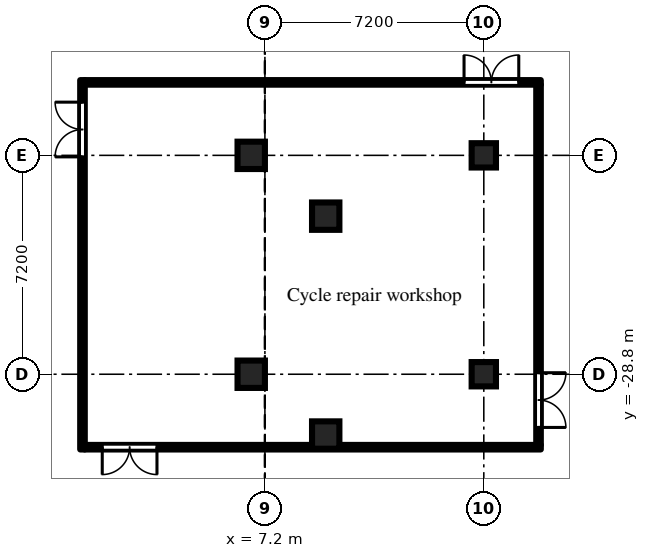
"""IFC4 building model, lengths in metres.
Left out: names, types, materials, properties, quantities, classifications, styles, units other than length and angle.
Written with IfcOpenShell. Run it as: python <this file> out.ifc"""

import sys

from ifc_helpers import new_model, si_unit, direction, frame, frame_2d, origin, origin_2d, place, context, subcontext, project, spatial, rectangle, extrude, element, fill, save


model = new_model("IFC4")
c1 = context("Model", 3, precision=1e-05, world=origin(), true_north=direction((0.0, 1.0)))
c2 = subcontext(c1, "Body", "Model", "MODEL_VIEW")
j1 = project(units=[si_unit("LENGTHUNIT", "METRE"), si_unit("PLANEANGLEUNIT", "RADIAN")], contexts=[c1])
p1 = place(None, origin())
s1 = spatial("IfcSite", under=j1, at=p1, CompositionType="ELEMENT")
p2 = place(p1, origin())
s2 = spatial("IfcBuilding", under=s1, at=p2, CompositionType="ELEMENT")
p3 = place(p2, frame((0.0, 0.0, -4.8)))
s3 = spatial("IfcBuildingStorey", under=s2, at=p3, CompositionType="ELEMENT", Elevation=-4.8)
for number, where, z_axis, x_axis in (
    (1, (6.75, -28.8, -0.5), (0.0, 0.0, 1.0), (1.0, 0.0, 0.0)),
    (2, (6.75, -21.6, -0.5), (0.0, 0.0, 1.0), (1.0, 0.0, 0.0)),
):
    element("IfcColumn", number, at=place(p3, frame(where, z_axis=z_axis, x_axis=x_axis)), inside=s3, PredefinedType="COLUMN", context=c2, shape_type="SweptSolid", body=[
        extrude(rectangle(XDim=0.9, YDim=0.9, at=origin_2d()), origin(), (0.0, 0.0, 1.0), 5.3),
    ])
for number, where, z_axis, x_axis in (
    (3, (14.4, -28.8, -0.5), (0.0, 0.0, 1.0), (1.0, 0.0, 0.0)),
    (4, (14.4, -21.6, -0.5), (0.0, 0.0, 1.0), (1.0, 0.0, 0.0)),
):
    element("IfcColumn", number, at=place(p3, frame(where, z_axis=z_axis, x_axis=x_axis)), inside=s3, PredefinedType="COLUMN", context=c2, shape_type="SweptSolid", body=[
        extrude(rectangle(XDim=0.8, YDim=0.8, at=origin_2d()), origin(), (0.0, 0.0, 1.0), 5.3),
    ])
for number, where, z_axis, x_axis in (
    (5, (9.2, -30.8, -0.5), (0.0, 0.0, 1.0), (1.0, 0.0, 0.0)),
    (6, (9.2, -23.6, -0.5), (0.0, 0.0, 1.0), (1.0, 0.0, 0.0)),
):
    element("IfcColumn", number, at=place(p3, frame(where, z_axis=z_axis, x_axis=x_axis)), inside=s3, PredefinedType="COLUMN", context=c2, shape_type="SweptSolid", body=[
        extrude(rectangle(XDim=0.9, YDim=0.9, at=origin_2d()), origin(), (0.0, 0.0, 1.0), 5.3),
    ])
p4 = place(p3, frame((1.2, -31.275, 0.0), z_axis=(0.0, 0.0, 1.0), x_axis=(0.0, 1.0, 0.0)))
e7 = element("IfcWall", 7, at=p4, inside=s3, PredefinedType="PARTITIONING", context=c2, shape_type="SweptSolid", body=[
    extrude(rectangle(XDim=12.15, YDim=0.15, at=frame_2d((6.075, 0.0))), origin(), (0.0, 0.0, 1.0), 4.35),
])
p5 = place(p4, frame((9.625, 0.0, 0.0)))
e8 = element("IfcOpeningElement", 8, at=p5, cuts=e7, PredefinedType="OPENING", context=c2, shape_type="SweptSolid", body=[
    extrude(rectangle(XDim=1.8, YDim=2.1, at=frame_2d((0.9, 1.05))), frame((0.0, 0.085, 0.0), z_axis=(0.0, -1.0, 0.0), x_axis=(1.0, 0.0, 0.0)), (0.0, 0.0, 1.0), 0.17),
])
p6 = place(p3, frame((1.275, -31.2, 0.0), z_axis=(0.0, 0.0, 1.0), x_axis=(1.0, 0.0, 0.0)))
e9 = element("IfcWall", 9, at=p6, inside=s3, PredefinedType="PARTITIONING", context=c2, shape_type="SweptSolid", body=[
    extrude(rectangle(XDim=15.0, YDim=0.15, at=frame_2d((7.5, 0.0))), origin(), (0.0, 0.0, 1.0), 4.35),
])
p7 = place(p6, frame((0.575, 0.0, 0.0)))
e10 = element("IfcOpeningElement", 10, at=p7, cuts=e9, PredefinedType="OPENING", context=c2, shape_type="SweptSolid", body=[
    extrude(rectangle(XDim=1.8, YDim=2.1, at=frame_2d((0.9, 1.05))), frame((0.0, 0.085, 0.0), z_axis=(0.0, -1.0, 0.0), x_axis=(1.0, 0.0, 0.0)), (0.0, 0.0, 1.0), 0.17),
])
p8 = place(p3, frame((1.275, -19.2, 0.0), z_axis=(0.0, 0.0, 1.0), x_axis=(1.0, 0.0, 0.0)))
e11 = element("IfcWall", 11, at=p8, inside=s3, PredefinedType="PARTITIONING", context=c2, shape_type="SweptSolid", body=[
    extrude(rectangle(XDim=15.0, YDim=0.15, at=frame_2d((7.5, 0.0))), origin(), (0.0, 0.0, 1.0), 4.35),
])
p9 = place(p8, frame((12.475, 0.0, 0.0)))
e12 = element("IfcOpeningElement", 12, at=p9, cuts=e11, PredefinedType="OPENING", context=c2, shape_type="SweptSolid", body=[
    extrude(rectangle(XDim=1.8, YDim=2.1, at=frame_2d((0.9, 1.05))), frame((0.0, 0.085, 0.0), z_axis=(0.0, -1.0, 0.0), x_axis=(1.0, 0.0, 0.0)), (0.0, 0.0, 1.0), 0.17),
])
p10 = place(p3, frame((16.2, -31.125, 0.0), z_axis=(0.0, 0.0, 1.0), x_axis=(0.0, 1.0, 0.0)))
e13 = element("IfcWall", 13, at=p10, inside=s3, PredefinedType="PARTITIONING", context=c2, shape_type="SweptSolid", body=[
    extrude(rectangle(XDim=11.85, YDim=0.15, at=frame_2d((5.925, 0.0))), origin(), (0.0, 0.0, 1.0), 4.35),
])
p11 = place(p10, frame((0.575, 0.0, 0.0)))
e14 = element("IfcOpeningElement", 14, at=p11, cuts=e13, PredefinedType="OPENING", context=c2, shape_type="SweptSolid", body=[
    extrude(rectangle(XDim=1.8, YDim=2.1, at=frame_2d((0.9, 1.05))), frame((0.0, 0.085, 0.0), z_axis=(0.0, -1.0, 0.0), x_axis=(1.0, 0.0, 0.0)), (0.0, 0.0, 1.0), 0.17),
])
p12 = place(p5, origin())
e15 = element("IfcDoor", 15, at=p12, inside=s3, OperationType="DOUBLE_DOOR_DOUBLE_SWING", PredefinedType="DOOR", context=c2, shape_type="SweptSolid", body=[
    extrude(rectangle(XDim=1.8, YDim=2.1, at=frame_2d((0.9, 1.05))), frame((0.0, 0.025, 0.0), z_axis=(0.0, -1.0, 0.0), x_axis=(1.0, 0.0, 0.0)), (0.0, 0.0, 1.0), 0.05),
])
fill(e8, e15)
p13 = place(p7, frame((1.8, 0.0, 0.0), z_axis=(0.0, 0.0, 1.0), x_axis=(-1.0, 0.0, 0.0)))
e16 = element("IfcDoor", 16, at=p13, inside=s3, OperationType="DOUBLE_DOOR_DOUBLE_SWING", PredefinedType="DOOR", context=c2, shape_type="SweptSolid", body=[
    extrude(rectangle(XDim=1.8, YDim=2.1, at=frame_2d((0.9, 1.05))), frame((0.0, 0.025, 0.0), z_axis=(0.0, -1.0, 0.0), x_axis=(1.0, 0.0, 0.0)), (0.0, 0.0, 1.0), 0.05),
])
fill(e10, e16)
p14 = place(p9, origin())
e17 = element("IfcDoor", 17, at=p14, inside=s3, OperationType="DOUBLE_DOOR_DOUBLE_SWING", PredefinedType="DOOR", context=c2, shape_type="SweptSolid", body=[
    extrude(rectangle(XDim=1.8, YDim=2.1, at=frame_2d((0.9, 1.05))), frame((0.0, 0.025, 0.0), z_axis=(0.0, -1.0, 0.0), x_axis=(1.0, 0.0, 0.0)), (0.0, 0.0, 1.0), 0.05),
])
fill(e12, e17)
p15 = place(p11, frame((1.8, 0.0, 0.0), z_axis=(0.0, 0.0, 1.0), x_axis=(-1.0, 0.0, 0.0)))
e18 = element("IfcDoor", 18, at=p15, inside=s3, OperationType="DOUBLE_DOOR_DOUBLE_SWING", PredefinedType="DOOR", context=c2, shape_type="SweptSolid", body=[
    extrude(rectangle(XDim=1.8, YDim=2.1, at=frame_2d((0.9, 1.05))), frame((0.0, 0.025, 0.0), z_axis=(0.0, -1.0, 0.0), x_axis=(1.0, 0.0, 0.0)), (0.0, 0.0, 1.0), 0.05),
])
fill(e14, e18)
save(model, sys.argv[1])
